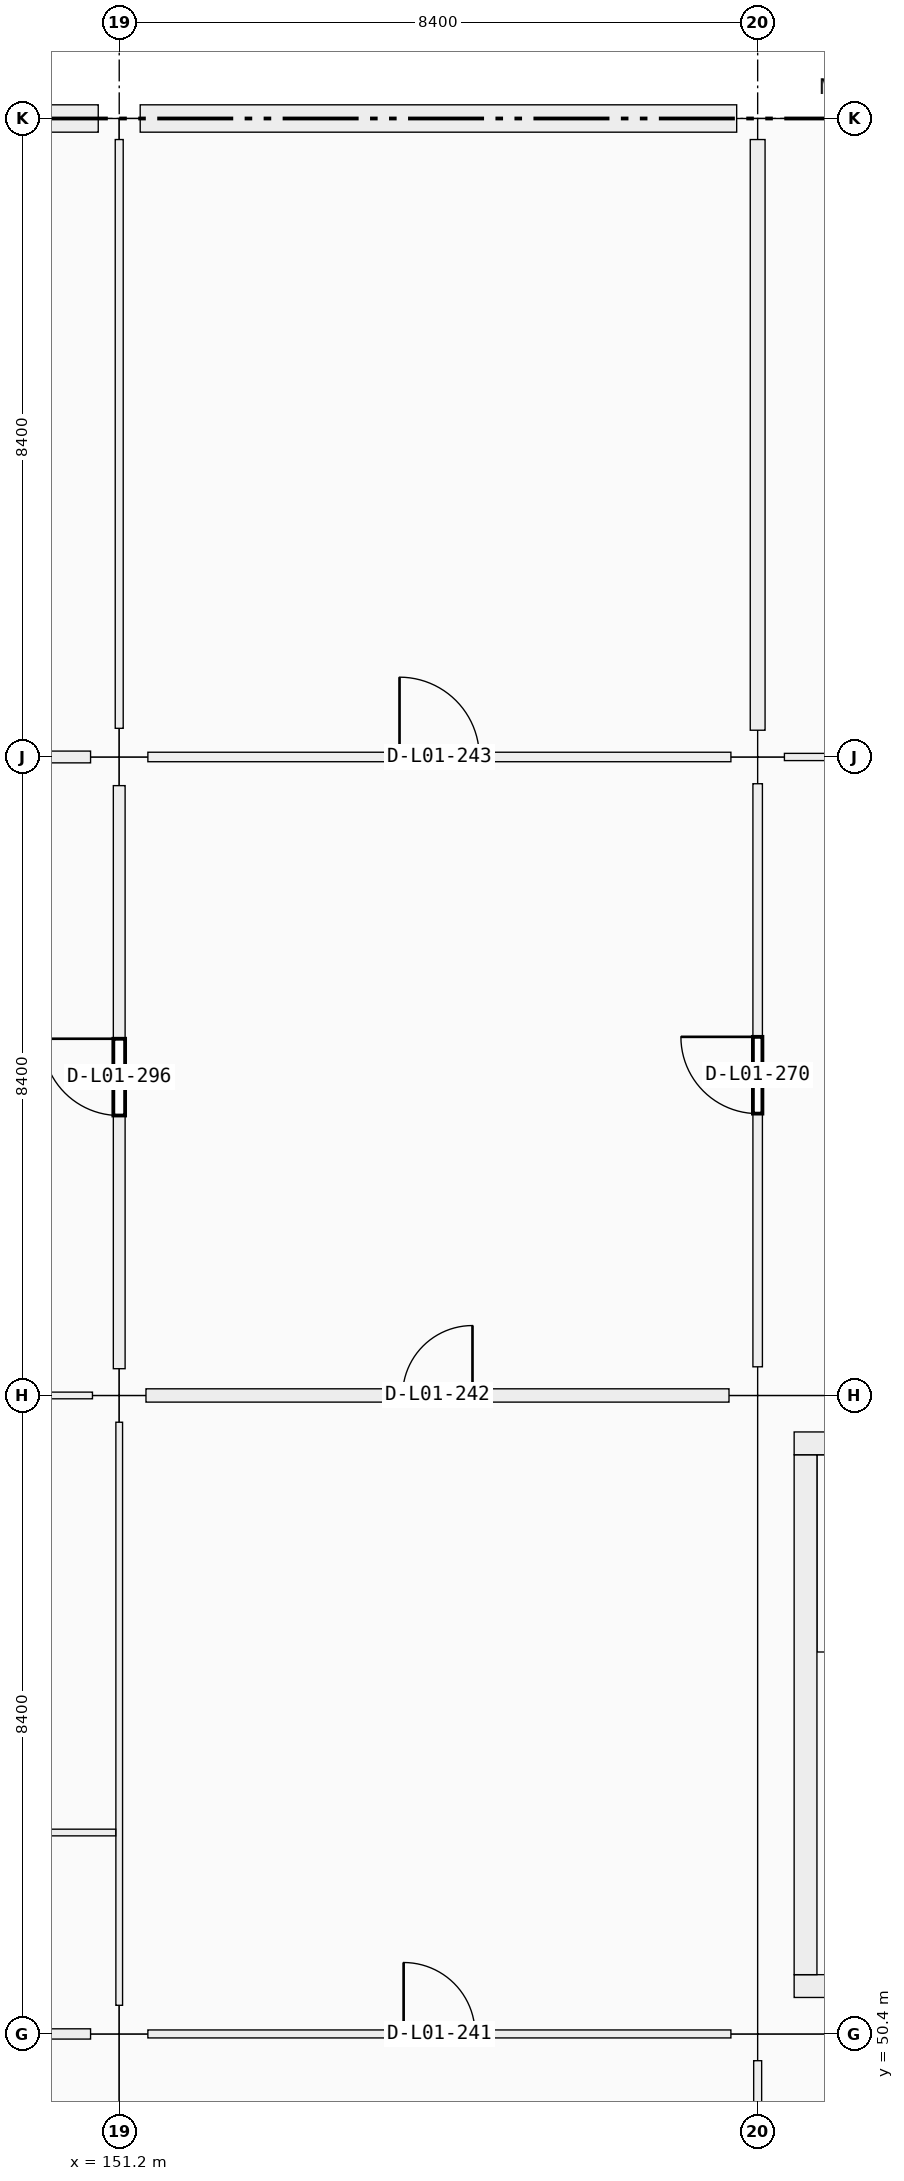
"""IFC4 building model, lengths in metres.
Left out: names, types, materials, properties, quantities, classifications, styles, units other than length and angle.
Written with IfcOpenShell. Run it as: python <this file> out.ifc"""

import sys

from ifc_helpers import new_model, si_unit, direction, frame, frame_2d, origin, origin_2d, place, context, subcontext, project, spatial, rectangle, extrude, element, fill, save


model = new_model("IFC4")
c1 = context("Model", 3, precision=1e-05, world=origin(), true_north=direction((0.0, 1.0)))
c2 = subcontext(c1, "Body", "Model", "MODEL_VIEW")
j1 = project(units=[si_unit("LENGTHUNIT", "METRE"), si_unit("PLANEANGLEUNIT", "RADIAN")], contexts=[c1])
p1 = place(None, origin())
s1 = spatial("IfcSite", under=j1, at=p1, CompositionType="ELEMENT")
p2 = place(p1, origin())
s2 = spatial("IfcBuilding", under=s1, at=p2, CompositionType="ELEMENT")
p3 = place(p2, frame((0.0, 0.0, 5.76)))
s3 = spatial("IfcBuildingStorey", under=s2, at=p3, CompositionType="ELEMENT", Elevation=5.76)
p4 = place(p3, frame((151.2, 50.4, 0.0), z_axis=(0.0, 0.0, 1.0), x_axis=(1.0, 0.0, 0.0)))
e1 = element("IfcColumn", 1, at=p4, inside=s3, PredefinedType="COLUMN", context=c2, shape_type="SweptSolid", body=[
    extrude(rectangle(XDim=0.75, YDim=0.75, at=origin_2d()), origin(), (0.0, 0.0, 1.0), 4.5),
])
p5 = place(p3, frame((151.2, 58.8, 0.0), z_axis=(0.0, 0.0, 1.0), x_axis=(1.0, 0.0, 0.0)))
e2 = element("IfcColumn", 2, at=p5, inside=s3, PredefinedType="COLUMN", context=c2, shape_type="SweptSolid", body=[
    extrude(rectangle(XDim=0.7, YDim=0.7, at=origin_2d()), origin(), (0.0, 0.0, 1.0), 4.5),
])
p6 = place(p3, frame((151.2, 67.2, 0.0), z_axis=(0.0, 0.0, 1.0), x_axis=(1.0, 0.0, 0.0)))
e3 = element("IfcColumn", 3, at=p6, inside=s3, PredefinedType="COLUMN", context=c2, shape_type="SweptSolid", body=[
    extrude(rectangle(XDim=0.75, YDim=0.75, at=origin_2d()), origin(), (0.0, 0.0, 1.0), 4.5),
])
p7 = place(p3, frame((151.2, 75.6, 0.0), z_axis=(0.0, 0.0, 1.0), x_axis=(1.0, 0.0, 0.0)))
e4 = element("IfcColumn", 4, at=p7, inside=s3, PredefinedType="COLUMN", context=c2, shape_type="SweptSolid", body=[
    extrude(rectangle(XDim=0.55, YDim=0.55, at=origin_2d()), origin(), (0.0, 0.0, 1.0), 4.2),
])
p8 = place(p3, frame((159.6, 50.4, 0.0), z_axis=(0.0, 0.0, 1.0), x_axis=(1.0, 0.0, 0.0)))
e5 = element("IfcColumn", 5, at=p8, inside=s3, PredefinedType="COLUMN", context=c2, shape_type="SweptSolid", body=[
    extrude(rectangle(XDim=0.7, YDim=0.7, at=origin_2d()), origin(), (0.0, 0.0, 1.0), 4.5),
])
p9 = place(p3, frame((159.6, 58.8, 0.0), z_axis=(0.0, 0.0, 1.0), x_axis=(1.0, 0.0, 0.0)))
e6 = element("IfcColumn", 6, at=p9, inside=s3, PredefinedType="COLUMN", context=c2, shape_type="SweptSolid", body=[
    extrude(rectangle(XDim=0.75, YDim=0.75, at=origin_2d()), origin(), (0.0, 0.0, 1.0), 4.5),
])
p10 = place(p3, frame((159.6, 67.2, 0.0), z_axis=(0.0, 0.0, 1.0), x_axis=(1.0, 0.0, 0.0)))
e7 = element("IfcColumn", 7, at=p10, inside=s3, PredefinedType="COLUMN", context=c2, shape_type="SweptSolid", body=[
    extrude(rectangle(XDim=0.7, YDim=0.7, at=origin_2d()), origin(), (0.0, 0.0, 1.0), 4.5),
])
p11 = place(p3, frame((159.6, 75.6, 0.0), z_axis=(0.0, 0.0, 1.0), x_axis=(1.0, 0.0, 0.0)))
e8 = element("IfcColumn", 8, at=p11, inside=s3, PredefinedType="COLUMN", context=c2, shape_type="SweptSolid", body=[
    extrude(rectangle(XDim=0.55, YDim=0.55, at=origin_2d()), origin(), (0.0, 0.0, 1.0), 4.2),
])
p12 = place(p3, frame((143.076, 75.6, 0.0), z_axis=(0.0, 0.0, 1.0), x_axis=(1.0, 0.0, 0.0)))
e9 = element("IfcWall", 9, at=p12, inside=s3, PredefinedType="SOLIDWALL", context=c2, shape_type="SweptSolid", body=[
    extrude(rectangle(XDim=7.848, YDim=0.36, at=frame_2d((3.924, 0.0))), origin(), (0.0, 0.0, 1.0), 3.4),
])
p13 = place(p12, frame((2.774, 0.0, 0.9)))
e10 = element("IfcOpeningElement", 10, at=p13, cuts=e9, PredefinedType="OPENING", context=c2, shape_type="SweptSolid", body=[
    extrude(rectangle(XDim=2.3, YDim=1.85, at=frame_2d((1.15, 0.925))), frame((0.0, 0.18, 0.0), z_axis=(0.0, -1.0, 0.0), x_axis=(1.0, 0.0, 0.0)), (0.0, 0.0, 1.0), 0.36),
])
p14 = place(p3, frame((151.476, 75.6, 0.0), z_axis=(0.0, 0.0, 1.0), x_axis=(1.0, 0.0, 0.0)))
e11 = element("IfcWall", 11, at=p14, inside=s3, PredefinedType="SOLIDWALL", context=c2, shape_type="SweptSolid", body=[
    extrude(rectangle(XDim=7.848, YDim=0.36, at=frame_2d((3.924, 0.0))), origin(), (0.0, 0.0, 1.0), 3.4),
])
p15 = place(p14, frame((2.474, 0.0, 0.9)))
e12 = element("IfcOpeningElement", 12, at=p15, cuts=e11, PredefinedType="OPENING", context=c2, shape_type="SweptSolid", body=[
    extrude(rectangle(XDim=2.9, YDim=1.85, at=frame_2d((1.45, 0.925))), frame((0.0, 0.18, 0.0), z_axis=(0.0, -1.0, 0.0), x_axis=(1.0, 0.0, 0.0)), (0.0, 0.0, 1.0), 0.36),
])
p16 = place(p3, frame((167.52, 51.03, 0.0), z_axis=(0.0, 0.0, 1.0), x_axis=(-1.0, 0.0, 0.0)))
e13 = element("IfcWall", 13, at=p16, inside=s3, PredefinedType="SHEAR", context=c2, shape_type="SweptSolid", body=[
    extrude(rectangle(XDim=7.44, YDim=0.3, at=frame_2d((3.72, 0.0))), origin(), (0.0, 0.0, 1.0), 4.5),
])
p17 = place(p16, frame((1.28, 0.0, 0.0)))
e14 = element("IfcOpeningElement", 14, at=p17, cuts=e13, PredefinedType="OPENING", context=c2, shape_type="SweptSolid", body=[
    extrude(rectangle(XDim=1.5, YDim=2.15, at=frame_2d((0.75, 1.075))), frame((0.0, 0.15, 0.0), z_axis=(0.0, -1.0, 0.0), x_axis=(1.0, 0.0, 0.0)), (0.0, 0.0, 1.0), 0.3),
])
p18 = place(p3, frame((160.23, 51.18, 0.0), z_axis=(0.0, 0.0, 1.0), x_axis=(0.0, 1.0, 0.0)))
e15 = element("IfcWall", 15, at=p18, inside=s3, PredefinedType="SHEAR", context=c2, shape_type="SweptSolid", body=[
    extrude(rectangle(XDim=6.84, YDim=0.3, at=frame_2d((3.42, 0.0))), origin(), (0.0, 0.0, 1.0), 4.5),
])
p19 = place(p3, frame((160.08, 58.17, 0.0), z_axis=(0.0, 0.0, 1.0), x_axis=(1.0, 0.0, 0.0)))
e16 = element("IfcWall", 16, at=p19, inside=s3, PredefinedType="SHEAR", context=c2, shape_type="SweptSolid", body=[
    extrude(rectangle(XDim=7.44, YDim=0.3, at=frame_2d((3.72, 0.0))), origin(), (0.0, 0.0, 1.0), 4.5),
])
p20 = place(p3, frame((143.152, 50.4, 0.0), z_axis=(0.0, 0.0, 1.0), x_axis=(1.0, 0.0, 0.0)))
e17 = element("IfcWall", 17, at=p20, inside=s3, PredefinedType="PARTITIONING", context=c2, shape_type="SweptSolid", body=[
    extrude(rectangle(XDim=7.671, YDim=0.135, at=frame_2d((3.835, 0.0))), origin(), (0.0, 0.0, 1.0), 2.4),
])
p21 = place(p3, frame((143.177, 58.8, 0.0), z_axis=(0.0, 0.0, 1.0), x_axis=(1.0, 0.0, 0.0)))
e18 = element("IfcWall", 18, at=p21, inside=s3, PredefinedType="PARTITIONING", context=c2, shape_type="SweptSolid", body=[
    extrude(rectangle(XDim=7.671, YDim=0.088, at=frame_2d((3.835, 0.0))), origin(), (0.0, 0.0, 1.0), 2.4),
])
p22 = place(p3, frame((143.152, 67.2, 0.0), z_axis=(0.0, 0.0, 1.0), x_axis=(1.0, 0.0, 0.0)))
e19 = element("IfcWall", 19, at=p22, inside=s3, PredefinedType="PARTITIONING", context=c2, shape_type="SweptSolid", body=[
    extrude(rectangle(XDim=7.671, YDim=0.155, at=frame_2d((3.835, 0.0))), origin(), (0.0, 0.0, 1.0), 2.4),
])
p23 = place(p22, frame((3.336, 0.0, 0.0)))
e20 = element("IfcOpeningElement", 20, at=p23, cuts=e19, PredefinedType="OPENING", context=c2, shape_type="SweptSolid", body=[
    extrude(rectangle(XDim=1.0, YDim=2.2, at=frame_2d((0.5, 1.1))), frame((0.0, 0.078, 0.0), z_axis=(0.0, -1.0, 0.0), x_axis=(1.0, 0.0, 0.0)), (0.0, 0.0, 1.0), 0.155),
])
p24 = place(p3, frame((151.577, 50.4, 0.0), z_axis=(0.0, 0.0, 1.0), x_axis=(1.0, 0.0, 0.0)))
e21 = element("IfcWall", 21, at=p24, inside=s3, PredefinedType="PARTITIONING", context=c2, shape_type="SweptSolid", body=[
    extrude(rectangle(XDim=7.671, YDim=0.105, at=frame_2d((3.835, 0.0))), origin(), (0.0, 0.0, 1.0), 2.4),
])
p25 = place(p24, frame((3.365, 0.0, 0.0)))
e22 = element("IfcOpeningElement", 22, at=p25, cuts=e21, PredefinedType="OPENING", context=c2, shape_type="SweptSolid", body=[
    extrude(rectangle(XDim=0.94, YDim=2.15, at=frame_2d((0.47, 1.075))), frame((0.0, 0.052, 0.0), z_axis=(0.0, -1.0, 0.0), x_axis=(1.0, 0.0, 0.0)), (0.0, 0.0, 1.0), 0.105),
])
p26 = place(p3, frame((151.552, 58.8, 0.0), z_axis=(0.0, 0.0, 1.0), x_axis=(1.0, 0.0, 0.0)))
e23 = element("IfcWall", 23, at=p26, inside=s3, PredefinedType="PARTITIONING", context=c2, shape_type="SweptSolid", body=[
    extrude(rectangle(XDim=7.671, YDim=0.175, at=frame_2d((3.835, 0.0))), origin(), (0.0, 0.0, 1.0), 2.4),
])
p27 = place(p26, frame((3.376, 0.0, 0.0)))
e24 = element("IfcOpeningElement", 24, at=p27, cuts=e23, PredefinedType="OPENING", context=c2, shape_type="SweptSolid", body=[
    extrude(rectangle(XDim=0.92, YDim=2.15, at=frame_2d((0.46, 1.075))), frame((0.0, 0.087, 0.0), z_axis=(0.0, -1.0, 0.0), x_axis=(1.0, 0.0, 0.0)), (0.0, 0.0, 1.0), 0.175),
])
p28 = place(p3, frame((151.577, 67.2, 0.0), z_axis=(0.0, 0.0, 1.0), x_axis=(1.0, 0.0, 0.0)))
e25 = element("IfcWall", 25, at=p28, inside=s3, PredefinedType="PARTITIONING", context=c2, shape_type="SweptSolid", body=[
    extrude(rectangle(XDim=7.671, YDim=0.125, at=frame_2d((3.835, 0.0))), origin(), (0.0, 0.0, 1.0), 2.4),
])
p29 = place(p28, frame((3.311, 0.0, 0.0)))
e26 = element("IfcOpeningElement", 26, at=p29, cuts=e25, PredefinedType="OPENING", context=c2, shape_type="SweptSolid", body=[
    extrude(rectangle(XDim=1.05, YDim=2.12, at=frame_2d((0.525, 1.06))), frame((0.0, 0.062, 0.0), z_axis=(0.0, -1.0, 0.0), x_axis=(1.0, 0.0, 0.0)), (0.0, 0.0, 1.0), 0.125),
])
p30 = place(p3, frame((159.952, 67.2, 0.0), z_axis=(0.0, 0.0, 1.0), x_axis=(1.0, 0.0, 0.0)))
e27 = element("IfcWall", 27, at=p30, inside=s3, PredefinedType="PARTITIONING", context=c2, shape_type="SweptSolid", body=[
    extrude(rectangle(XDim=7.671, YDim=0.095, at=frame_2d((3.835, 0.0))), origin(), (0.0, 0.0, 1.0), 2.4),
])
p31 = place(p30, frame((3.351, 0.0, 0.0)))
e28 = element("IfcOpeningElement", 28, at=p31, cuts=e27, PredefinedType="OPENING", context=c2, shape_type="SweptSolid", body=[
    extrude(rectangle(XDim=0.97, YDim=2.12, at=frame_2d((0.485, 1.06))), frame((0.0, 0.047, 0.0), z_axis=(0.0, -1.0, 0.0), x_axis=(1.0, 0.0, 0.0)), (0.0, 0.0, 1.0), 0.095),
])
p32 = place(p3, frame((151.2, 50.777, 0.0), z_axis=(0.0, 0.0, 1.0), x_axis=(0.0, 1.0, 0.0)))
e29 = element("IfcWall", 29, at=p32, inside=s3, PredefinedType="PARTITIONING", context=c2, shape_type="SweptSolid", body=[
    extrude(rectangle(XDim=7.671, YDim=0.088, at=frame_2d((3.835, 0.0))), origin(), (0.0, 0.0, 1.0), 2.4),
])
p33 = place(p3, frame((151.2, 59.152, 0.0), z_axis=(0.0, 0.0, 1.0), x_axis=(0.0, 1.0, 0.0)))
e30 = element("IfcWall", 30, at=p33, inside=s3, PredefinedType="PARTITIONING", context=c2, shape_type="SweptSolid", body=[
    extrude(rectangle(XDim=7.671, YDim=0.155, at=frame_2d((3.835, 0.0))), origin(), (0.0, 0.0, 1.0), 2.4),
])
p34 = place(p33, frame((3.331, 0.0, 0.0)))
e31 = element("IfcOpeningElement", 31, at=p34, cuts=e30, PredefinedType="OPENING", context=c2, shape_type="SweptSolid", body=[
    extrude(rectangle(XDim=1.01, YDim=2.12, at=frame_2d((0.505, 1.06))), frame((0.0, 0.078, 0.0), z_axis=(0.0, -1.0, 0.0), x_axis=(1.0, 0.0, 0.0)), (0.0, 0.0, 1.0), 0.155),
])
p35 = place(p3, frame((151.2, 67.577, 0.0), z_axis=(0.0, 0.0, 1.0), x_axis=(0.0, 1.0, 0.0)))
e32 = element("IfcWall", 32, at=p35, inside=s3, PredefinedType="PARTITIONING", context=c2, shape_type="SweptSolid", body=[
    extrude(rectangle(XDim=7.746, YDim=0.105, at=frame_2d((3.873, 0.0))), origin(), (0.0, 0.0, 1.0), 2.4),
])
p36 = place(p35, frame((3.388, 0.0, 0.0)))
e33 = element("IfcOpeningElement", 33, at=p36, cuts=e32, PredefinedType="OPENING", context=c2, shape_type="SweptSolid", body=[
    extrude(rectangle(XDim=0.97, YDim=2.12, at=frame_2d((0.485, 1.06))), frame((0.0, 0.052, 0.0), z_axis=(0.0, -1.0, 0.0), x_axis=(1.0, 0.0, 0.0)), (0.0, 0.0, 1.0), 0.105),
])
p37 = place(p3, frame((159.6, 42.377, 0.0), z_axis=(0.0, 0.0, 1.0), x_axis=(0.0, 1.0, 0.0)))
e34 = element("IfcWall", 34, at=p37, inside=s3, PredefinedType="PARTITIONING", context=c2, shape_type="SweptSolid", body=[
    extrude(rectangle(XDim=7.671, YDim=0.105, at=frame_2d((3.835, 0.0))), origin(), (0.0, 0.0, 1.0), 2.4),
])
p38 = place(p37, frame((3.311, 0.0, 0.0)))
e35 = element("IfcOpeningElement", 35, at=p38, cuts=e34, PredefinedType="OPENING", context=c2, shape_type="SweptSolid", body=[
    extrude(rectangle(XDim=1.05, YDim=2.12, at=frame_2d((0.525, 1.06))), frame((0.0, 0.052, 0.0), z_axis=(0.0, -1.0, 0.0), x_axis=(1.0, 0.0, 0.0)), (0.0, 0.0, 1.0), 0.105),
])
p39 = place(p3, frame((159.6, 59.177, 0.0), z_axis=(0.0, 0.0, 1.0), x_axis=(0.0, 1.0, 0.0)))
e36 = element("IfcWall", 36, at=p39, inside=s3, PredefinedType="PARTITIONING", context=c2, shape_type="SweptSolid", body=[
    extrude(rectangle(XDim=7.671, YDim=0.125, at=frame_2d((3.835, 0.0))), origin(), (0.0, 0.0, 1.0), 2.4),
])
p40 = place(p39, frame((3.331, 0.0, 0.0)))
e37 = element("IfcOpeningElement", 37, at=p40, cuts=e36, PredefinedType="OPENING", context=c2, shape_type="SweptSolid", body=[
    extrude(rectangle(XDim=1.01, YDim=2.12, at=frame_2d((0.505, 1.06))), frame((0.0, 0.062, 0.0), z_axis=(0.0, -1.0, 0.0), x_axis=(1.0, 0.0, 0.0)), (0.0, 0.0, 1.0), 0.125),
])
p41 = place(p3, frame((159.6, 67.552, 0.0), z_axis=(0.0, 0.0, 1.0), x_axis=(0.0, 1.0, 0.0)))
e38 = element("IfcWall", 38, at=p41, inside=s3, PredefinedType="PARTITIONING", context=c2, shape_type="SweptSolid", body=[
    extrude(rectangle(XDim=7.771, YDim=0.195, at=frame_2d((3.885, 0.0))), origin(), (0.0, 0.0, 1.0), 2.4),
])
p42 = place(p41, frame((3.365, 0.0, 0.0)))
e39 = element("IfcOpeningElement", 39, at=p42, cuts=e38, PredefinedType="OPENING", context=c2, shape_type="SweptSolid", body=[
    extrude(rectangle(XDim=1.04, YDim=2.2, at=frame_2d((0.52, 1.1))), frame((0.0, 0.098, 0.0), z_axis=(0.0, -1.0, 0.0), x_axis=(1.0, 0.0, 0.0)), (0.0, 0.0, 1.0), 0.195),
])
p43 = place(p3, frame((142.86, 53.05, 0.0), z_axis=(0.0, 0.0, 1.0), x_axis=(1.0, 0.0, 0.0)))
e40 = element("IfcWall", 40, at=p43, inside=s3, PredefinedType="PARTITIONING", context=c2, shape_type="SweptSolid", body=[
    extrude(rectangle(XDim=8.294, YDim=0.088, at=frame_2d((4.147, 0.0))), origin(), (0.0, 0.0, 1.0), 2.4),
])
p44 = place(p15, origin())
e41 = element("IfcWindow", 41, at=p44, inside=s3, PartitioningType="SINGLE_PANEL", PredefinedType="WINDOW", context=c2, shape_type="SweptSolid", body=[
    extrude(rectangle(XDim=2.9, YDim=1.85, at=frame_2d((1.45, 0.925))), frame((0.0, 0.03, 0.0), z_axis=(0.0, -1.0, 0.0), x_axis=(1.0, 0.0, 0.0)), (0.0, 0.0, 1.0), 0.06),
])
fill(e12, e41)
p45 = place(p25, origin())
e42 = element("IfcDoor", 42, at=p45, inside=s3, OperationType="SINGLE_SWING_LEFT", PredefinedType="DOOR", context=c2, shape_type="SweptSolid", body=[
    extrude(rectangle(XDim=0.94, YDim=2.15, at=frame_2d((0.47, 1.075))), frame((0.0, 0.025, 0.0), z_axis=(0.0, -1.0, 0.0), x_axis=(1.0, 0.0, 0.0)), (0.0, 0.0, 1.0), 0.05),
])
fill(e22, e42)
p46 = place(p27, origin())
e43 = element("IfcDoor", 43, at=p46, inside=s3, OperationType="SINGLE_SWING_RIGHT", PredefinedType="DOOR", context=c2, shape_type="SweptSolid", body=[
    extrude(rectangle(XDim=0.92, YDim=2.15, at=frame_2d((0.46, 1.075))), frame((0.0, 0.025, 0.0), z_axis=(0.0, -1.0, 0.0), x_axis=(1.0, 0.0, 0.0)), (0.0, 0.0, 1.0), 0.05),
])
fill(e24, e43)
p47 = place(p29, origin())
e44 = element("IfcDoor", 44, at=p47, inside=s3, OperationType="SINGLE_SWING_LEFT", PredefinedType="DOOR", context=c2, shape_type="SweptSolid", body=[
    extrude(rectangle(XDim=1.05, YDim=2.12, at=frame_2d((0.525, 1.06))), frame((0.0, 0.025, 0.0), z_axis=(0.0, -1.0, 0.0), x_axis=(1.0, 0.0, 0.0)), (0.0, 0.0, 1.0), 0.05),
])
fill(e26, e44)
p48 = place(p40, origin())
e45 = element("IfcDoor", 45, at=p48, inside=s3, OperationType="SINGLE_SWING_RIGHT", PredefinedType="DOOR", context=c2, shape_type="SweptSolid", body=[
    extrude(rectangle(XDim=1.01, YDim=2.12, at=frame_2d((0.505, 1.06))), frame((0.0, 0.025, 0.0), z_axis=(0.0, -1.0, 0.0), x_axis=(1.0, 0.0, 0.0)), (0.0, 0.0, 1.0), 0.05),
])
fill(e37, e45)
p49 = place(p34, origin())
e46 = element("IfcDoor", 46, at=p49, inside=s3, OperationType="SINGLE_SWING_RIGHT", PredefinedType="DOOR", context=c2, shape_type="SweptSolid", body=[
    extrude(rectangle(XDim=1.01, YDim=2.12, at=frame_2d((0.505, 1.06))), frame((0.0, 0.025, 0.0), z_axis=(0.0, -1.0, 0.0), x_axis=(1.0, 0.0, 0.0)), (0.0, 0.0, 1.0), 0.05),
])
fill(e31, e46)
p50 = place(p36, origin())
e47 = element("IfcDoor", 47, at=p50, inside=s3, OperationType="SINGLE_SWING_LEFT", PredefinedType="DOOR", context=c2, shape_type="SweptSolid", body=[
    extrude(rectangle(XDim=0.97, YDim=2.12, at=frame_2d((0.485, 1.06))), frame((0.0, 0.025, 0.0), z_axis=(0.0, -1.0, 0.0), x_axis=(1.0, 0.0, 0.0)), (0.0, 0.0, 1.0), 0.05),
])
fill(e33, e47)
p51 = place(p42, origin())
e48 = element("IfcDoor", 48, at=p51, inside=s3, OperationType="SINGLE_SWING_LEFT", PredefinedType="DOOR", context=c2, shape_type="SweptSolid", body=[
    extrude(rectangle(XDim=1.04, YDim=2.2, at=frame_2d((0.52, 1.1))), frame((0.0, 0.025, 0.0), z_axis=(0.0, -1.0, 0.0), x_axis=(1.0, 0.0, 0.0)), (0.0, 0.0, 1.0), 0.05),
])
fill(e39, e48)
save(model, sys.argv[1])
